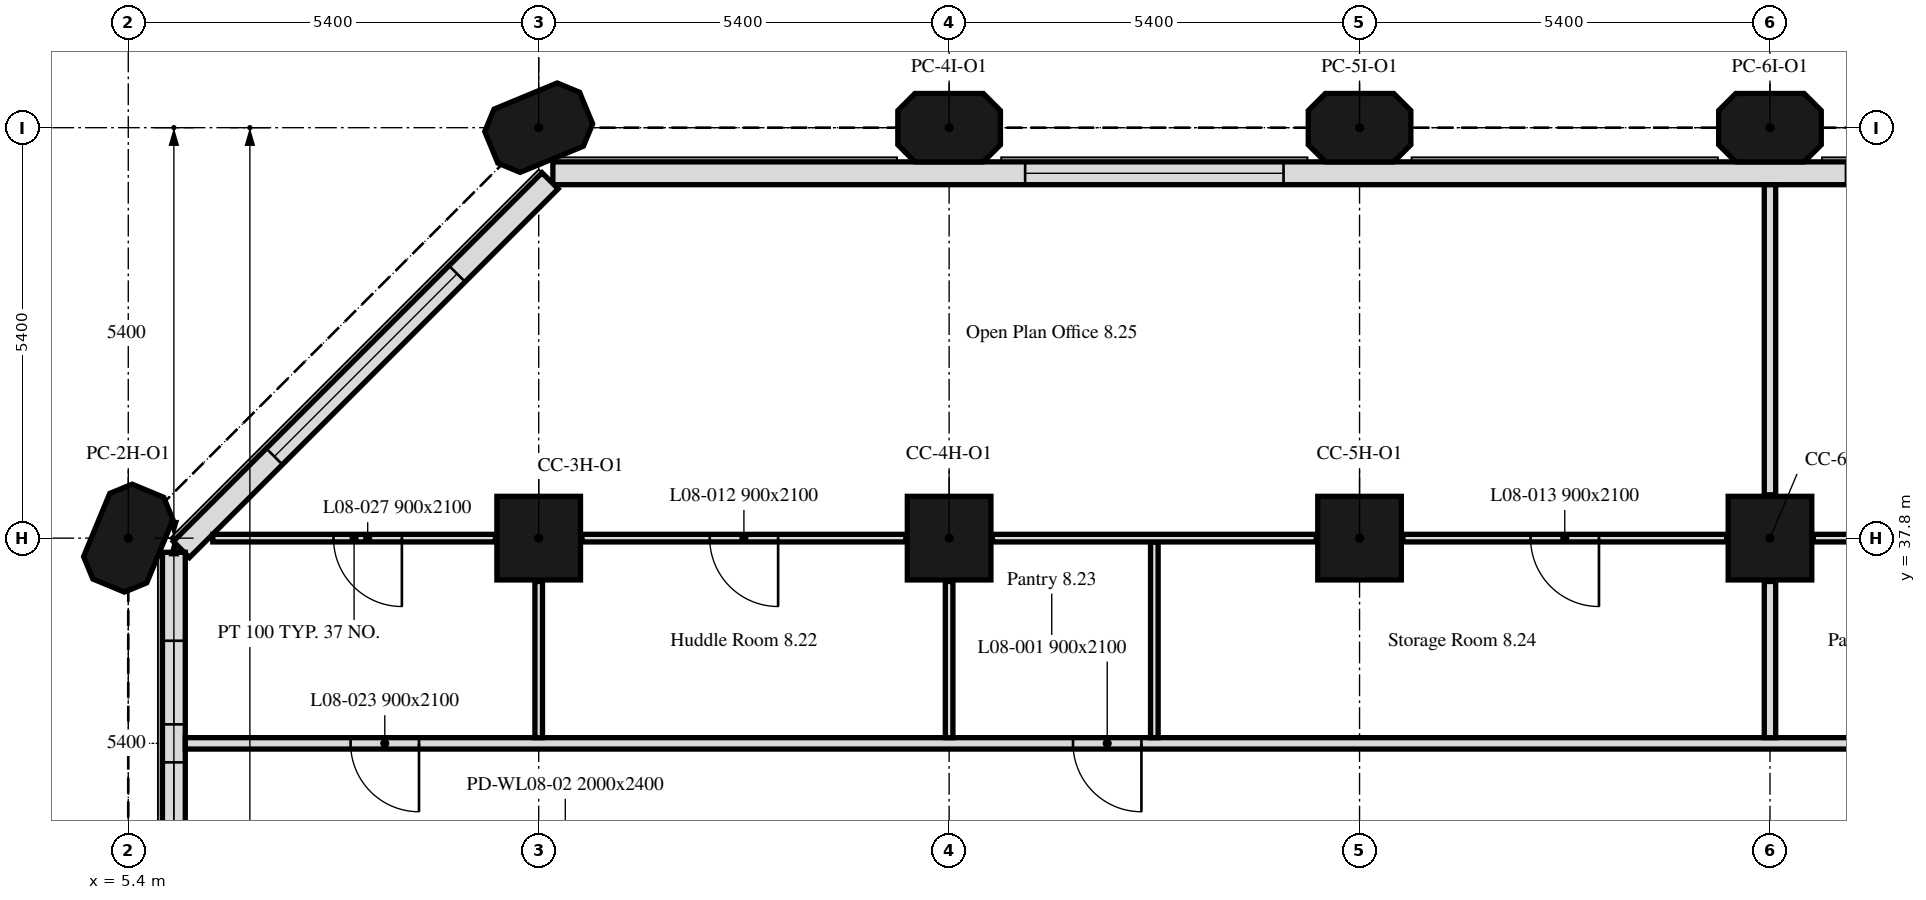
"""IFC4 building model, lengths in metres.
Left out: names, types, materials, properties, quantities, classifications, styles, units other than length and angle.
Written with IfcOpenShell. Run it as: python <this file> out.ifc"""

import sys

from ifc_helpers import new_model, si_unit, direction, frame, frame_2d, origin, origin_2d, place, context, subcontext, project, spatial, polyline, rectangle, outline, extrude, element, fill, save


model = new_model("IFC4")
c1 = context("Model", 3, precision=1e-05, world=origin(), true_north=direction((0.0, 1.0)))
c2 = subcontext(c1, "Body", "Model", "MODEL_VIEW")
j1 = project(units=[si_unit("LENGTHUNIT", "METRE"), si_unit("PLANEANGLEUNIT", "RADIAN")], contexts=[c1])
p1 = place(None, origin())
s1 = spatial("IfcSite", under=j1, at=p1, CompositionType="ELEMENT")
p2 = place(p1, origin())
s2 = spatial("IfcBuilding", under=s1, at=p2, CompositionType="ELEMENT")
p3 = place(p2, frame((0.0, 0.0, 41.2)))
s3 = spatial("IfcBuildingStorey", under=s2, at=p3, CompositionType="ELEMENT", Elevation=41.2)
p4 = place(p3, frame((5.4, 37.8, 0.0), z_axis=(0.0, 0.0, 1.0), x_axis=(0.382683432365, 0.923879532511, 0.0)))
e1 = element("IfcColumn", 1, at=p4, inside=s3, PredefinedType="COLUMN", context=c2, shape_type="SweptSolid", body=[
    extrude(outline(polyline([(-0.45, -0.45), (0.45, -0.45), (0.675, -0.225), (0.675, 0.225), (0.45, 0.45), (-0.45, 0.45), (-0.675, 0.225), (-0.675, -0.225), (-0.45, -0.45)])), origin(), (0.0, 0.0, 1.0), 3.5),
])
for number, where, z_axis, x_axis in (
    (2, (10.8, 37.8, 0.0), (0.0, 0.0, 1.0), (1.0, 0.0, 0.0)),
    (3, (16.2, 37.8, 0.0), (0.0, 0.0, 1.0), (1.0, 0.0, 0.0)),
    (4, (21.6, 37.8, 0.0), (0.0, 0.0, 1.0), (1.0, 0.0, 0.0)),
    (5, (27.0, 37.8, 0.0), (0.0, 0.0, 1.0), (1.0, 0.0, 0.0)),
):
    element("IfcColumn", number, at=place(p3, frame(where, z_axis=z_axis, x_axis=x_axis)), inside=s3, PredefinedType="COLUMN", context=c2, shape_type="SweptSolid", body=[
        extrude(rectangle(XDim=1.1, YDim=1.1, at=origin_2d()), origin(), (0.0, 0.0, 1.0), 3.5),
    ])
for number, where, z_axis, x_axis in (
    (6, (10.8, 43.2, 0.0), (0.0, 0.0, 1.0), (0.924, 0.383, 0.0)),
    (7, (16.2, 43.2, 0.0), (0.0, 0.0, 1.0), (1.0, 0.0, 0.0)),
    (8, (21.6, 43.2, 0.0), (0.0, 0.0, 1.0), (1.0, 0.0, 0.0)),
    (9, (27.0, 43.2, 0.0), (0.0, 0.0, 1.0), (1.0, 0.0, 0.0)),
):
    element("IfcColumn", number, at=place(p3, frame(where, z_axis=z_axis, x_axis=x_axis)), inside=s3, PredefinedType="COLUMN", context=c2, shape_type="SweptSolid", body=[
        extrude(outline(polyline([(-0.45, -0.45), (0.45, -0.45), (0.675, -0.225), (0.675, 0.225), (0.45, 0.45), (-0.45, 0.45), (-0.675, 0.225), (-0.675, -0.225), (-0.45, -0.45)])), origin(), (0.0, 0.0, 1.0), 3.5),
    ])
p5 = place(p3, frame((43.014, 42.6, 0.0), z_axis=(0.0, 0.0, 1.0), x_axis=(-1.0, 0.0, 0.0)))
e10 = element("IfcWall", 10, at=p5, inside=s3, PredefinedType="SOLIDWALL", context=c2, shape_type="SweptSolid", body=[
    extrude(rectangle(XDim=32.027, YDim=0.3, at=frame_2d((16.014, 0.0))), origin(), (0.0, 0.0, 1.0), 3.5),
])
p6 = place(p5, frame((0.814, 0.0, 0.9)))
e11 = element("IfcOpeningElement", 11, at=p6, cuts=e10, PredefinedType="OPENING", context=c2, shape_type="SweptSolid", body=[
    extrude(rectangle(XDim=3.4, YDim=1.7, at=frame_2d((1.7, 0.85))), frame((0.0, 0.16, 0.0), z_axis=(0.0, -1.0, 0.0), x_axis=(1.0, 0.0, 0.0)), (0.0, 0.0, 1.0), 0.32),
])
p7 = place(p5, frame((11.614, 0.0, 0.9)))
e12 = element("IfcOpeningElement", 12, at=p7, cuts=e10, PredefinedType="OPENING", context=c2, shape_type="SweptSolid", body=[
    extrude(rectangle(XDim=3.4, YDim=1.7, at=frame_2d((1.7, 0.85))), frame((0.0, 0.16, 0.0), z_axis=(0.0, -1.0, 0.0), x_axis=(1.0, 0.0, 0.0)), (0.0, 0.0, 1.0), 0.32),
])
p8 = place(p5, frame((22.414, 0.0, 0.9)))
e13 = element("IfcOpeningElement", 13, at=p8, cuts=e10, PredefinedType="OPENING", context=c2, shape_type="SweptSolid", body=[
    extrude(rectangle(XDim=3.4, YDim=1.7, at=frame_2d((1.7, 0.85))), frame((0.0, 0.16, 0.0), z_axis=(0.0, -1.0, 0.0), x_axis=(1.0, 0.0, 0.0)), (0.0, 0.0, 1.0), 0.32),
])
p9 = place(p3, frame((10.949, 42.501, 0.0), z_axis=(0.0, 0.0, 1.0), x_axis=(-0.707106781187, -0.707106781187, 0.0)))
e14 = element("IfcWall", 14, at=p9, inside=s3, PredefinedType="SOLIDWALL", context=c2, shape_type="SweptSolid", body=[
    extrude(rectangle(XDim=6.86, YDim=0.3, at=frame_2d((3.43, 0.0))), origin(), (0.0, 0.0, 1.0), 3.5),
])
p10 = place(p9, frame((1.73, 0.0, 0.9)))
e15 = element("IfcOpeningElement", 15, at=p10, cuts=e14, PredefinedType="OPENING", context=c2, shape_type="SweptSolid", body=[
    extrude(rectangle(XDim=3.4, YDim=1.7, at=frame_2d((1.7, 0.85))), frame((0.0, 0.16, 0.0), z_axis=(0.0, -1.0, 0.0), x_axis=(1.0, 0.0, 0.0)), (0.0, 0.0, 1.0), 0.32),
])
p11 = place(p3, frame((6.0, 37.614, 0.0), z_axis=(0.0, 0.0, 1.0), x_axis=(0.0, -1.0, 0.0)))
e16 = element("IfcWall", 16, at=p11, inside=s3, PredefinedType="SOLIDWALL", context=c2, shape_type="SweptSolid", body=[
    extrude(rectangle(XDim=5.214, YDim=0.3, at=frame_2d((2.607, 0.0))), origin(), (0.0, 0.0, 1.0), 3.5),
])
p12 = place(p11, frame((1.164, 0.0, 0.9)))
e17 = element("IfcOpeningElement", 17, at=p12, cuts=e16, PredefinedType="OPENING", context=c2, shape_type="SweptSolid", body=[
    extrude(rectangle(XDim=1.1, YDim=1.7, at=frame_2d((0.55, 0.85))), frame((0.0, 0.16, 0.0), z_axis=(0.0, -1.0, 0.0), x_axis=(1.0, 0.0, 0.0)), (0.0, 0.0, 1.0), 0.32),
])
p13 = place(p11, frame((2.764, 0.0, 0.9)))
e18 = element("IfcOpeningElement", 18, at=p13, cuts=e16, PredefinedType="OPENING", context=c2, shape_type="SweptSolid", body=[
    extrude(rectangle(XDim=1.1, YDim=1.7, at=frame_2d((0.55, 0.85))), frame((0.0, 0.16, 0.0), z_axis=(0.0, -1.0, 0.0), x_axis=(1.0, 0.0, 0.0)), (0.0, 0.0, 1.0), 0.32),
])
p14 = place(p3, frame((47.849, 35.1, 0.0), z_axis=(0.0, 0.0, 1.0), x_axis=(-1.0, 0.0, 0.0)))
e19 = element("IfcWall", 19, at=p14, inside=s3, PredefinedType="PARTITIONING", context=c2, shape_type="SweptSolid", body=[
    extrude(rectangle(XDim=41.698, YDim=0.15, at=frame_2d((20.849, 0.0))), origin(), (0.0, 0.0, 1.0), 3.5),
])
p15 = place(p14, frame((29.119, 0.0, 0.0)))
e20 = element("IfcOpeningElement", 20, at=p15, cuts=e19, PredefinedType="OPENING", context=c2, shape_type="SweptSolid", body=[
    extrude(rectangle(XDim=0.9, YDim=2.1, at=frame_2d((0.45, 1.05))), frame((0.0, 0.075, 0.0), z_axis=(0.0, -1.0, 0.0), x_axis=(1.0, 0.0, 0.0)), (0.0, 0.0, 1.0), 0.15),
])
p16 = place(p14, frame((18.319, 0.0, 0.0)))
e21 = element("IfcOpeningElement", 21, at=p16, cuts=e19, PredefinedType="OPENING", context=c2, shape_type="SweptSolid", body=[
    extrude(rectangle(XDim=0.9, YDim=2.1, at=frame_2d((0.45, 1.05))), frame((0.0, 0.075, 0.0), z_axis=(0.0, -1.0, 0.0), x_axis=(1.0, 0.0, 0.0)), (0.0, 0.0, 1.0), 0.15),
])
p17 = place(p14, frame((17.079, 0.0, 0.0)))
e22 = element("IfcOpeningElement", 22, at=p17, cuts=e19, PredefinedType="OPENING", context=c2, shape_type="SweptSolid", body=[
    extrude(rectangle(XDim=0.9, YDim=2.1, at=frame_2d((0.45, 1.05))), frame((0.0, 0.075, 0.0), z_axis=(0.0, -1.0, 0.0), x_axis=(1.0, 0.0, 0.0)), (0.0, 0.0, 1.0), 0.15),
])
p18 = place(p14, frame((7.519, 0.0, 0.0)))
e23 = element("IfcOpeningElement", 23, at=p18, cuts=e19, PredefinedType="OPENING", context=c2, shape_type="SweptSolid", body=[
    extrude(rectangle(XDim=0.9, YDim=2.1, at=frame_2d((0.45, 1.05))), frame((0.0, 0.075, 0.0), z_axis=(0.0, -1.0, 0.0), x_axis=(1.0, 0.0, 0.0)), (0.0, 0.0, 1.0), 0.15),
])
p19 = place(p14, frame((38.624, 0.0, 0.0)))
e24 = element("IfcOpeningElement", 24, at=p19, cuts=e19, PredefinedType="OPENING", context=c2, shape_type="SweptSolid", body=[
    extrude(rectangle(XDim=0.9, YDim=2.1, at=frame_2d((0.45, 1.05))), frame((0.0, 0.075, 0.0), z_axis=(0.0, -1.0, 0.0), x_axis=(1.0, 0.0, 0.0)), (0.0, 0.0, 1.0), 0.15),
])
p20 = place(p14, frame((6.279, 0.0, 0.0)))
e25 = element("IfcOpeningElement", 25, at=p20, cuts=e19, PredefinedType="OPENING", context=c2, shape_type="SweptSolid", body=[
    extrude(rectangle(XDim=0.9, YDim=2.1, at=frame_2d((0.45, 1.05))), frame((0.0, 0.075, 0.0), z_axis=(0.0, -1.0, 0.0), x_axis=(1.0, 0.0, 0.0)), (0.0, 0.0, 1.0), 0.15),
])
p21 = place(p3, frame((10.23, 37.8, 0.0), z_axis=(0.0, 0.0, 1.0), x_axis=(-1.0, 0.0, 0.0)))
e26 = element("IfcWall", 26, at=p21, inside=s3, PredefinedType="PARTITIONING", context=c2, shape_type="SweptSolid", body=[
    extrude(rectangle(XDim=3.718, YDim=0.1, at=frame_2d((1.859, 0.0))), origin(), (0.0, 0.0, 1.0), 3.5),
])
p22 = place(p21, frame((1.23, 0.0, 0.0)))
e27 = element("IfcOpeningElement", 27, at=p22, cuts=e26, PredefinedType="OPENING", context=c2, shape_type="SweptSolid", body=[
    extrude(rectangle(XDim=0.9, YDim=2.1, at=frame_2d((0.45, 1.05))), frame((0.0, 0.05, 0.0), z_axis=(0.0, -1.0, 0.0), x_axis=(1.0, 0.0, 0.0)), (0.0, 0.0, 1.0), 0.1),
])
for number, where, z_axis, x_axis in (
    (28, (10.8, 35.175, 0.0), (0.0, 0.0, 1.0), (0.0, 1.0, 0.0)),
    (29, (16.2, 35.175, 0.0), (0.0, 0.0, 1.0), (0.0, 1.0, 0.0)),
):
    element("IfcWall", number, at=place(p3, frame(where, z_axis=z_axis, x_axis=x_axis)), inside=s3, PredefinedType="PARTITIONING", context=c2, shape_type="SweptSolid", body=[
        extrude(rectangle(XDim=2.055, YDim=0.1, at=frame_2d((1.027, 0.0))), origin(), (0.0, 0.0, 1.0), 3.5),
    ])
p23 = place(p3, frame((15.63, 37.8, 0.0), z_axis=(0.0, 0.0, 1.0), x_axis=(-1.0, 0.0, 0.0)))
e30 = element("IfcWall", 30, at=p23, inside=s3, PredefinedType="PARTITIONING", context=c2, shape_type="SweptSolid", body=[
    extrude(rectangle(XDim=4.26, YDim=0.1, at=frame_2d((2.13, 0.0))), origin(), (0.0, 0.0, 1.0), 3.5),
])
p24 = place(p23, frame((1.68, 0.0, 0.0)))
e31 = element("IfcOpeningElement", 31, at=p24, cuts=e30, PredefinedType="OPENING", context=c2, shape_type="SweptSolid", body=[
    extrude(rectangle(XDim=0.9, YDim=2.1, at=frame_2d((0.45, 1.05))), frame((0.0, 0.05, 0.0), z_axis=(0.0, -1.0, 0.0), x_axis=(1.0, 0.0, 0.0)), (0.0, 0.0, 1.0), 0.1),
])
p25 = place(p3, frame((18.9, 35.175, 0.0), z_axis=(0.0, 0.0, 1.0), x_axis=(0.0, 1.0, 0.0)))
e32 = element("IfcWall", 32, at=p25, inside=s3, PredefinedType="PARTITIONING", context=c2, shape_type="SweptSolid", body=[
    extrude(rectangle(XDim=2.575, YDim=0.1, at=frame_2d((1.288, 0.0))), origin(), (0.0, 0.0, 1.0), 3.5),
])
p26 = place(p3, frame((27.0, 35.175, 0.0), z_axis=(0.0, 0.0, 1.0), x_axis=(0.0, 1.0, 0.0)))
e33 = element("IfcWall", 33, at=p26, inside=s3, PredefinedType="PARTITIONING", context=c2, shape_type="SweptSolid", body=[
    extrude(rectangle(XDim=2.055, YDim=0.15, at=frame_2d((1.027, 0.0))), origin(), (0.0, 0.0, 1.0), 3.5),
])
p27 = place(p3, frame((26.43, 37.8, 0.0), z_axis=(0.0, 0.0, 1.0), x_axis=(-1.0, 0.0, 0.0)))
e34 = element("IfcWall", 34, at=p27, inside=s3, PredefinedType="PARTITIONING", context=c2, shape_type="SweptSolid", body=[
    extrude(rectangle(XDim=4.26, YDim=0.1, at=frame_2d((2.13, 0.0))), origin(), (0.0, 0.0, 1.0), 3.5),
])
p28 = place(p27, frame((1.68, 0.0, 0.0)))
e35 = element("IfcOpeningElement", 35, at=p28, cuts=e34, PredefinedType="OPENING", context=c2, shape_type="SweptSolid", body=[
    extrude(rectangle(XDim=0.9, YDim=2.1, at=frame_2d((0.45, 1.05))), frame((0.0, 0.05, 0.0), z_axis=(0.0, -1.0, 0.0), x_axis=(1.0, 0.0, 0.0)), (0.0, 0.0, 1.0), 0.1),
])
p29 = place(p3, frame((21.03, 37.8, 0.0), z_axis=(0.0, 0.0, 1.0), x_axis=(-1.0, 0.0, 0.0)))
e36 = element("IfcWall", 36, at=p29, inside=s3, PredefinedType="PARTITIONING", context=c2, shape_type="SweptSolid", body=[
    extrude(rectangle(XDim=4.26, YDim=0.1, at=frame_2d((2.13, 0.0))), origin(), (0.0, 0.0, 1.0), 3.5),
])
p30 = place(p3, frame((27.0, 38.37, 0.0), z_axis=(0.0, 0.0, 1.0), x_axis=(0.0, 1.0, 0.0)))
e37 = element("IfcWall", 37, at=p30, inside=s3, PredefinedType="PARTITIONING", context=c2, shape_type="SweptSolid", body=[
    extrude(rectangle(XDim=4.079, YDim=0.15, at=frame_2d((2.04, 0.0))), origin(), (0.0, 0.0, 1.0), 3.5),
])
p31 = place(p3, frame((31.83, 37.8, 0.0), z_axis=(0.0, 0.0, 1.0), x_axis=(-1.0, 0.0, 0.0)))
e38 = element("IfcWall", 38, at=p31, inside=s3, PredefinedType="PARTITIONING", context=c2, shape_type="SweptSolid", body=[
    extrude(rectangle(XDim=4.26, YDim=0.1, at=frame_2d((2.13, 0.0))), origin(), (0.0, 0.0, 1.0), 3.5),
])
p32 = place(p8, origin())
e39 = element("IfcWindow", 39, at=p32, inside=s3, PartitioningType="SINGLE_PANEL", PredefinedType="WINDOW", context=c2, shape_type="SweptSolid", body=[
    extrude(rectangle(XDim=3.4, YDim=1.7, at=frame_2d((1.7, 0.85))), frame((0.0, 0.03, 0.0), z_axis=(0.0, -1.0, 0.0), x_axis=(1.0, 0.0, 0.0)), (0.0, 0.0, 1.0), 0.06),
])
fill(e13, e39)
p33 = place(p10, origin())
e40 = element("IfcWindow", 40, at=p33, inside=s3, PartitioningType="SINGLE_PANEL", PredefinedType="WINDOW", context=c2, shape_type="SweptSolid", body=[
    extrude(rectangle(XDim=3.4, YDim=1.7, at=frame_2d((1.7, 0.85))), frame((0.0, 0.03, 0.0), z_axis=(0.0, -1.0, 0.0), x_axis=(1.0, 0.0, 0.0)), (0.0, 0.0, 1.0), 0.06),
])
fill(e15, e40)
p34 = place(p12, origin())
e41 = element("IfcWindow", 41, at=p34, inside=s3, PartitioningType="SINGLE_PANEL", PredefinedType="WINDOW", context=c2, shape_type="SweptSolid", body=[
    extrude(rectangle(XDim=1.1, YDim=1.7, at=frame_2d((0.55, 0.85))), frame((0.0, 0.03, 0.0), z_axis=(0.0, -1.0, 0.0), x_axis=(1.0, 0.0, 0.0)), (0.0, 0.0, 1.0), 0.06),
])
fill(e17, e41)
p35 = place(p13, origin())
e42 = element("IfcWindow", 42, at=p35, inside=s3, PartitioningType="SINGLE_PANEL", PredefinedType="WINDOW", context=c2, shape_type="SweptSolid", body=[
    extrude(rectangle(XDim=1.1, YDim=1.7, at=frame_2d((0.55, 0.85))), frame((0.0, 0.03, 0.0), z_axis=(0.0, -1.0, 0.0), x_axis=(1.0, 0.0, 0.0)), (0.0, 0.0, 1.0), 0.06),
])
fill(e18, e42)
p36 = place(p15, origin())
e43 = element("IfcDoor", 43, at=p36, inside=s3, OperationType="SINGLE_SWING_LEFT", PredefinedType="DOOR", context=c2, shape_type="SweptSolid", body=[
    extrude(rectangle(XDim=0.9, YDim=2.1, at=frame_2d((0.45, 1.05))), frame((0.0, 0.025, 0.0), z_axis=(0.0, -1.0, 0.0), x_axis=(1.0, 0.0, 0.0)), (0.0, 0.0, 1.0), 0.05),
])
fill(e20, e43)
p37 = place(p24, origin())
e44 = element("IfcDoor", 44, at=p37, inside=s3, OperationType="SINGLE_SWING_LEFT", PredefinedType="DOOR", context=c2, shape_type="SweptSolid", body=[
    extrude(rectangle(XDim=0.9, YDim=2.1, at=frame_2d((0.45, 1.05))), frame((0.0, 0.025, 0.0), z_axis=(0.0, -1.0, 0.0), x_axis=(1.0, 0.0, 0.0)), (0.0, 0.0, 1.0), 0.05),
])
fill(e31, e44)
p38 = place(p28, origin())
e45 = element("IfcDoor", 45, at=p38, inside=s3, OperationType="SINGLE_SWING_RIGHT", PredefinedType="DOOR", context=c2, shape_type="SweptSolid", body=[
    extrude(rectangle(XDim=0.9, YDim=2.1, at=frame_2d((0.45, 1.05))), frame((0.0, 0.025, 0.0), z_axis=(0.0, -1.0, 0.0), x_axis=(1.0, 0.0, 0.0)), (0.0, 0.0, 1.0), 0.05),
])
fill(e35, e45)
p39 = place(p19, origin())
e46 = element("IfcDoor", 46, at=p39, inside=s3, OperationType="SINGLE_SWING_LEFT", PredefinedType="DOOR", context=c2, shape_type="SweptSolid", body=[
    extrude(rectangle(XDim=0.9, YDim=2.1, at=frame_2d((0.45, 1.05))), frame((0.0, 0.025, 0.0), z_axis=(0.0, -1.0, 0.0), x_axis=(1.0, 0.0, 0.0)), (0.0, 0.0, 1.0), 0.05),
])
fill(e24, e46)
p40 = place(p22, origin())
e47 = element("IfcDoor", 47, at=p40, inside=s3, OperationType="SINGLE_SWING_RIGHT", PredefinedType="DOOR", context=c2, shape_type="SweptSolid", body=[
    extrude(rectangle(XDim=0.9, YDim=2.1, at=frame_2d((0.45, 1.05))), frame((0.0, 0.025, 0.0), z_axis=(0.0, -1.0, 0.0), x_axis=(1.0, 0.0, 0.0)), (0.0, 0.0, 1.0), 0.05),
])
fill(e27, e47)
save(model, sys.argv[1])
